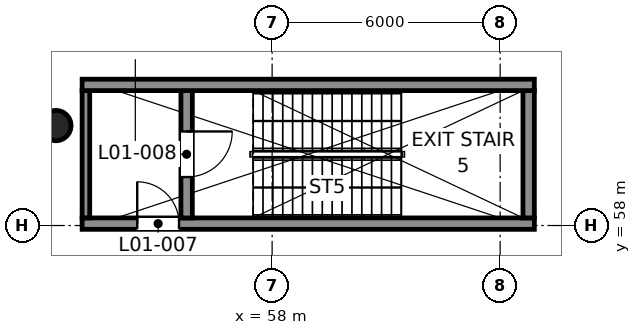
"""IFC4 building model, lengths in metres.
Left out: names, types, materials, properties, quantities, classifications, styles, units other than length and angle.
Written with IfcOpenShell. Run it as: python <this file> out.ifc"""

import sys

from ifc_helpers import new_model, si_unit, direction, frame, frame_2d, origin, origin_2d, place, context, subcontext, project, spatial, rectangle, circle, extrude, element, fill, save


model = new_model("IFC4")
c1 = context("Model", 3, precision=1e-05, world=origin(), true_north=direction((0.0, 1.0)))
c2 = subcontext(c1, "Body", "Model", "MODEL_VIEW")
j1 = project(units=[si_unit("LENGTHUNIT", "METRE"), si_unit("PLANEANGLEUNIT", "RADIAN")], contexts=[c1])
p1 = place(None, origin())
s1 = spatial("IfcSite", under=j1, at=p1, CompositionType="ELEMENT")
p2 = place(p1, origin())
s2 = spatial("IfcBuilding", under=s1, at=p2, CompositionType="ELEMENT")
p3 = place(p2, frame((0.0, 0.0, 9.0)))
s3 = spatial("IfcBuildingStorey", under=s2, at=p3, CompositionType="ELEMENT", Elevation=9.0)
p4 = place(p3, frame((52.31, 60.63, 0.0), z_axis=(0.0, 0.0, 1.0), x_axis=(1.0, 0.0, 0.0)))
e1 = element("IfcColumn", 1, at=p4, inside=s3, PredefinedType="COLUMN", context=c2, shape_type="SweptSolid", body=[
    extrude(circle(Radius=0.4, at=origin_2d()), origin(), (0.0, 0.0, 1.0), 6.0),
])
p5 = place(p3, frame((53.0, 58.05, 0.0), z_axis=(0.0, 0.0, 1.0), x_axis=(1.0, 0.0, 0.0)))
e2 = element("IfcWall", 2, at=p5, inside=s3, PredefinedType="SHEAR", context=c2, shape_type="SweptSolid", body=[
    extrude(rectangle(XDim=11.9, YDim=0.3, at=frame_2d((5.95, 0.0))), origin(), (0.0, 0.0, 1.0), 6.0),
])
p6 = place(p5, frame((1.45, 0.0, 0.0)))
e3 = element("IfcOpeningElement", 3, at=p6, cuts=e2, PredefinedType="OPENING", context=c2, shape_type="SweptSolid", body=[
    extrude(rectangle(XDim=1.1, YDim=2.1, at=frame_2d((0.55, 1.05))), frame((0.0, 0.16, 0.0), z_axis=(0.0, -1.0, 0.0), x_axis=(1.0, 0.0, 0.0)), (0.0, 0.0, 1.0), 0.32),
])
p7 = place(p3, frame((53.1, 58.2, 0.0), z_axis=(0.0, 0.0, 1.0), x_axis=(0.0, 1.0, 0.0)))
e4 = element("IfcWall", 4, at=p7, inside=s3, PredefinedType="SHEAR", context=c2, shape_type="SweptSolid", body=[
    extrude(rectangle(XDim=3.35, YDim=0.2, at=frame_2d((1.675, 0.0))), origin(), (0.0, 0.0, 1.0), 6.0),
])
p8 = place(p3, frame((55.75, 58.2, 0.0), z_axis=(0.0, 0.0, 1.0), x_axis=(0.0, 1.0, 0.0)))
e5 = element("IfcWall", 5, at=p8, inside=s3, PredefinedType="SHEAR", context=c2, shape_type="SweptSolid", body=[
    extrude(rectangle(XDim=3.35, YDim=0.3, at=frame_2d((1.675, 0.0))), origin(), (0.0, 0.0, 1.0), 6.0),
])
p9 = place(p8, frame((1.075, 0.0, 0.0)))
e6 = element("IfcOpeningElement", 6, at=p9, cuts=e5, PredefinedType="OPENING", context=c2, shape_type="SweptSolid", body=[
    extrude(rectangle(XDim=1.2, YDim=2.1, at=frame_2d((0.6, 1.05))), frame((0.0, 0.16, 0.0), z_axis=(0.0, -1.0, 0.0), x_axis=(1.0, 0.0, 0.0)), (0.0, 0.0, 1.0), 0.32),
])
p10 = place(p3, frame((64.75, 58.2, 0.0), z_axis=(0.0, 0.0, 1.0), x_axis=(0.0, 1.0, 0.0)))
e7 = element("IfcWall", 7, at=p10, inside=s3, PredefinedType="SHEAR", context=c2, shape_type="SweptSolid", body=[
    extrude(rectangle(XDim=3.35, YDim=0.3, at=frame_2d((1.675, 0.0))), origin(), (0.0, 0.0, 1.0), 6.0),
])
p11 = place(p3, frame((53.0, 61.7, 0.0), z_axis=(0.0, 0.0, 1.0), x_axis=(1.0, 0.0, 0.0)))
e8 = element("IfcWall", 8, at=p11, inside=s3, PredefinedType="SHEAR", context=c2, shape_type="SweptSolid", body=[
    extrude(rectangle(XDim=11.9, YDim=0.3, at=frame_2d((5.95, 0.0))), origin(), (0.0, 0.0, 1.0), 6.0),
])
p12 = place(p6, origin())
e9 = element("IfcDoor", 9, at=p12, inside=s3, OperationType="SINGLE_SWING_LEFT", PredefinedType="DOOR", context=c2, shape_type="SweptSolid", body=[
    extrude(rectangle(XDim=1.1, YDim=2.1, at=frame_2d((0.55, 1.05))), frame((0.0, 0.025, 0.0), z_axis=(0.0, -1.0, 0.0), x_axis=(1.0, 0.0, 0.0)), (0.0, 0.0, 1.0), 0.05),
])
fill(e3, e9)
p13 = place(p9, frame((1.2, 0.0, 0.0), z_axis=(0.0, 0.0, 1.0), x_axis=(-1.0, 0.0, 0.0)))
e10 = element("IfcDoor", 10, at=p13, inside=s3, OperationType="SINGLE_SWING_LEFT", PredefinedType="DOOR", context=c2, shape_type="SweptSolid", body=[
    extrude(rectangle(XDim=1.2, YDim=2.1, at=frame_2d((0.6, 1.05))), frame((0.0, 0.025, 0.0), z_axis=(0.0, -1.0, 0.0), x_axis=(1.0, 0.0, 0.0)), (0.0, 0.0, 1.0), 0.05),
])
fill(e6, e10)
save(model, sys.argv[1])
